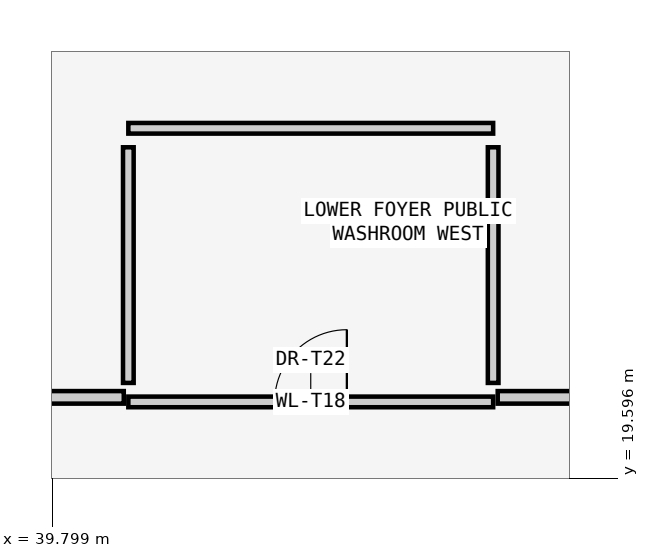
"""IFC4 building model, lengths in metres.
Left out: names, types, materials, properties, quantities, classifications, styles, units other than length and angle.
Written with IfcOpenShell. Run it as: python <this file> out.ifc"""

import sys

from ifc_helpers import new_model, si_unit, direction, frame, frame_2d, origin, place, context, subcontext, project, spatial, rectangle, extrude, element, fill, save


model = new_model("IFC4")
c1 = context("Model", 3, precision=1e-05, world=origin(), true_north=direction((0.0, 1.0)))
c2 = subcontext(c1, "Body", "Model", "MODEL_VIEW")
j1 = project(units=[si_unit("LENGTHUNIT", "METRE"), si_unit("PLANEANGLEUNIT", "RADIAN")], contexts=[c1])
p1 = place(None, origin())
s1 = spatial("IfcSite", under=j1, at=p1, CompositionType="ELEMENT")
p2 = place(p1, origin())
s2 = spatial("IfcBuilding", under=s1, at=p2, CompositionType="ELEMENT")
p3 = place(p2, frame((0.0, 0.0, -4.8)))
s3 = spatial("IfcBuildingStorey", under=s2, at=p3, CompositionType="ELEMENT", Elevation=-4.8)
p4 = place(p3, frame((40.8, 20.6, 0.0), z_axis=(0.0, 0.0, 1.0), x_axis=(1.0, 0.0, 0.0)))
e1 = element("IfcWall", 1, at=p4, inside=s3, PredefinedType="PARTITIONING", context=c2, shape_type="SweptSolid", body=[
    extrude(rectangle(XDim=4.8, YDim=0.14, at=frame_2d((2.4, 0.0))), origin(), (0.0, 0.0, 1.0), 4.32),
])
p5 = place(p4, frame((1.925, 0.0, 0.0)))
e2 = element("IfcOpeningElement", 2, at=p5, cuts=e1, PredefinedType="OPENING", context=c2, shape_type="SweptSolid", body=[
    extrude(rectangle(XDim=0.95, YDim=2.15, at=frame_2d((0.475, 1.075))), frame((0.0, 0.08, 0.0), z_axis=(0.0, -1.0, 0.0), x_axis=(1.0, 0.0, 0.0)), (0.0, 0.0, 1.0), 0.16),
])
p6 = place(p3, frame((40.8, 24.2, 0.0), z_axis=(0.0, 0.0, 1.0), x_axis=(1.0, 0.0, 0.0)))
e3 = element("IfcWall", 3, at=p6, inside=s3, PredefinedType="PARTITIONING", context=c2, shape_type="SweptSolid", body=[
    extrude(rectangle(XDim=4.8, YDim=0.14, at=frame_2d((2.4, 0.0))), origin(), (0.0, 0.0, 1.0), 4.32),
])
for number, where, z_axis, x_axis in (
    (4, (40.8, 20.85, 0.0), (0.0, 0.0, 1.0), (0.0, 1.0, 0.0)),
    (5, (45.6, 20.85, 0.0), (0.0, 0.0, 1.0), (0.0, 1.0, 0.0)),
):
    element("IfcWall", number, at=place(p3, frame(where, z_axis=z_axis, x_axis=x_axis)), inside=s3, PredefinedType="PARTITIONING", context=c2, shape_type="SweptSolid", body=[
        extrude(rectangle(XDim=3.1, YDim=0.14, at=frame_2d((1.55, 0.0))), origin(), (0.0, 0.0, 1.0), 4.32),
    ])
p7 = place(p3, frame((38.51, 20.66, 0.0), z_axis=(0.0, 0.0, 1.0), x_axis=(1.0, 0.0, 0.0)))
e6 = element("IfcWall", 6, at=p7, inside=s3, PredefinedType="PARTITIONING", context=c2, shape_type="SweptSolid", body=[
    extrude(rectangle(XDim=2.23, YDim=0.165, at=frame_2d((1.115, 0.0))), origin(), (0.0, 0.0, 1.0), 4.33),
])
p8 = place(p3, frame((45.66, 20.66, 0.0), z_axis=(0.0, 0.0, 1.0), x_axis=(1.0, 0.0, 0.0)))
e7 = element("IfcWall", 7, at=p8, inside=s3, PredefinedType="PARTITIONING", context=c2, shape_type="SweptSolid", body=[
    extrude(rectangle(XDim=12.14, YDim=0.165, at=frame_2d((6.07, 0.0))), origin(), (0.0, 0.0, 1.0), 4.33),
])
p9 = place(p5, origin())
e8 = element("IfcDoor", 8, at=p9, inside=s3, OperationType="SINGLE_SWING_RIGHT", PredefinedType="DOOR", context=c2, shape_type="SweptSolid", body=[
    extrude(rectangle(XDim=0.95, YDim=2.15, at=frame_2d((0.475, 1.075))), frame((0.0, 0.025, 0.0), z_axis=(0.0, -1.0, 0.0), x_axis=(1.0, 0.0, 0.0)), (0.0, 0.0, 1.0), 0.05),
])
fill(e2, e8)
save(model, sys.argv[1])
